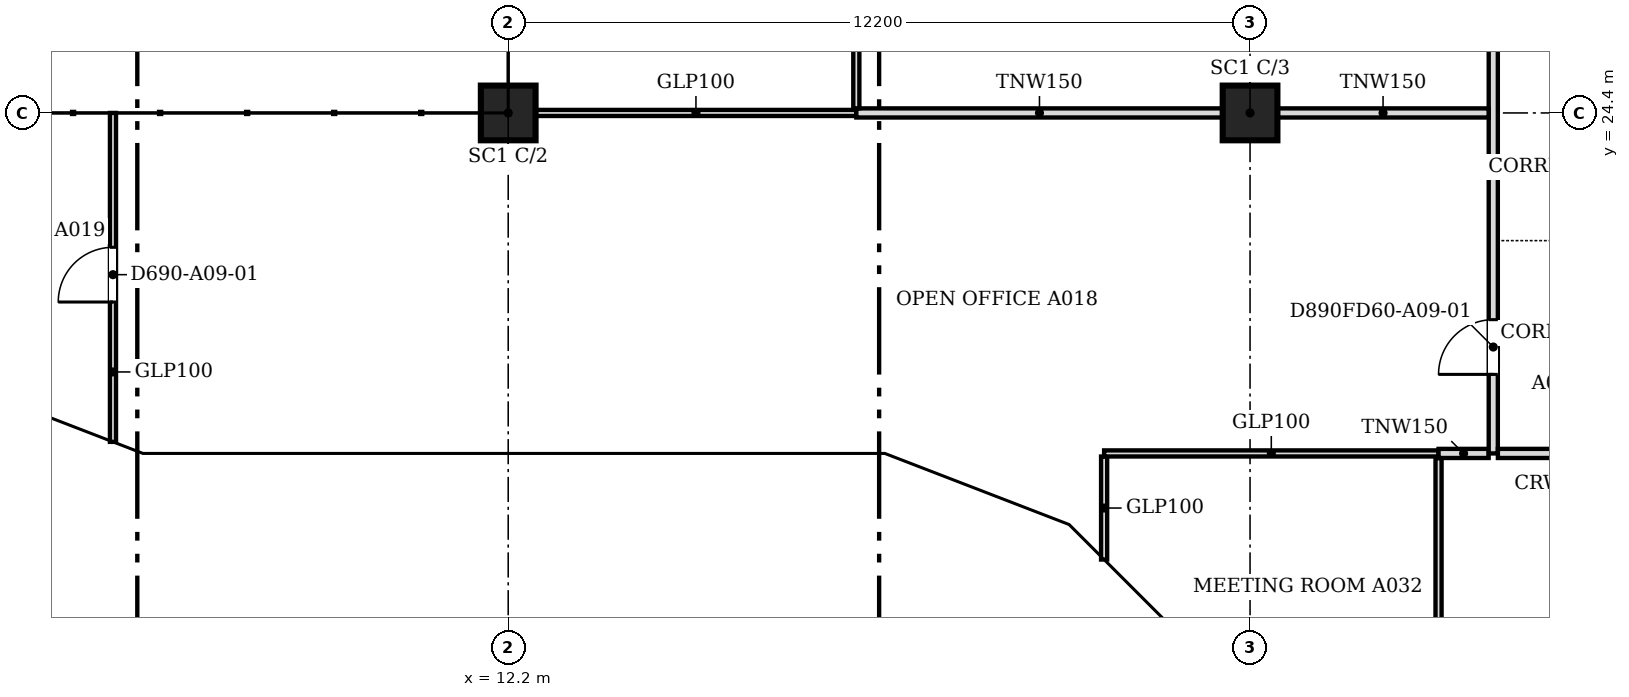
"""IFC4 building model, lengths in metres.
Left out: names, types, materials, properties, quantities, classifications, styles, units other than length and angle.
Written with IfcOpenShell. Run it as: python <this file> out.ifc"""

import sys

from ifc_helpers import new_model, si_unit, direction, frame, frame_2d, origin, origin_2d, place, context, subcontext, project, spatial, polyline, rectangle, outline, extrude, faceted_brep, source, transform, mapped, element, fill, save


model = new_model("IFC4")
c1 = context("Model", 3, precision=1e-05, world=origin(), true_north=direction((0.0, 1.0)))
c2 = subcontext(c1, "Body", "Model", "MODEL_VIEW")
j1 = project(units=[si_unit("LENGTHUNIT", "METRE"), si_unit("PLANEANGLEUNIT", "RADIAN")], contexts=[c1])
p1 = place(None, origin())
s1 = spatial("IfcSite", under=j1, at=p1, CompositionType="ELEMENT")
p2 = place(p1, origin())
s2 = spatial("IfcBuilding", under=s1, at=p2, CompositionType="ELEMENT")
p3 = place(p2, frame((0.0, 0.0, 99.0)))
s3 = spatial("IfcBuildingStorey", under=s2, at=p3, CompositionType="ELEMENT", Elevation=99.0)
for number, where, z_axis, x_axis in (
    (1, (12.2, 24.4, 0.0), (0.0, 0.0, 1.0), (1.0, 0.0, 0.0)),
    (2, (24.4, 24.4, 0.0), (0.0, 0.0, 1.0), (1.0, 0.0, 0.0)),
):
    element("IfcColumn", number, at=place(p3, frame(where, z_axis=z_axis, x_axis=x_axis)), inside=s3, PredefinedType="COLUMN", context=c2, shape_type="SweptSolid", body=[
        extrude(rectangle(XDim=0.9, YDim=0.9, at=origin_2d()), origin(), (0.0, 0.0, 1.0), 3.6),
    ])
m1 = source(origin(), c2, "Body", "Brep", [
    faceted_brep([(2.95, -0.25, 0.0), (2.997, -0.25, 0.059), (2.997, -0.25, 7.541), (2.95, -0.25, 7.6), (0.0, -0.25, 3.8), (0.053, 0.25, 3.868), (2.904, 0.25, 7.54), (2.904, 0.25, 0.06), (0.053, 0.25, 3.732), (2.95, 0.0, 0.0), (2.95, 0.0, 7.6), (0.0, 0.0, 3.8)], [[[0, 1, 2, 3, 4]], [[5, 6, 7, 8]], [[1, 0, 9]], [[10, 3, 2]], [[6, 5, 11, 4, 3, 10]], [[8, 7, 9, 0, 4, 11]], [[8, 11, 5]], [[1, 9, 7, 6, 10, 2]]]),
])
p4 = place(p3, frame((3.394, 19.612, -3.8), z_axis=(0.0, 0.0, 1.0), x_axis=(0.932990326376, -0.359901446078, 0.0)))
e3 = element("IfcWall", 3, at=p4, inside=s3, PredefinedType="SOLIDWALL", context=c2, shape_type="MappedRepresentation", body=[
    mapped(m1, transform((0.0, 0.0, 0.0), scale=1.0)),
])
m2 = source(origin(), c2, "Body", "SweptSolid", [
    extrude(outline(polyline([(2.75, 6.935), (0.316, 3.8), (2.75, 0.665), (2.75, 6.935)])), frame((0.0, 0.26, 0.0), z_axis=(0.0, -1.0, 0.0), x_axis=(1.0, 0.0, 0.0)), (0.0, 0.0, 1.0), 0.52),
])
p5 = place(p4, origin())
e4 = element("IfcOpeningElement", 4, at=p5, cuts=e3, PredefinedType="OPENING", context=c2, shape_type="MappedRepresentation", body=[
    mapped(m2, transform((0.0, 0.0, 0.0), scale=1.0)),
])
m3 = source(origin(), c2, "Body", "Brep", [
    faceted_brep([(0.047, -0.25, 0.0), (3.05, -0.25, 3.8), (0.047, -0.25, 7.6), (0.0, -0.25, 7.54), (0.0, -0.25, 0.06), (0.093, 0.25, 7.541), (3.05, 0.25, 3.8), (0.093, 0.25, 0.059), (0.047, 0.0, 0.0), (0.047, 0.0, 7.6)], [[[0, 1, 2, 3, 4]], [[5, 6, 7]], [[7, 6, 1, 0, 8]], [[6, 5, 9, 2, 1]], [[3, 2, 9]], [[8, 0, 4]], [[7, 8, 4, 3, 9, 5]]]),
])
p6 = place(p3, frame((6.1, 18.55, -3.8), z_axis=(0.0, 0.0, 1.0), x_axis=(1.0, 0.0, 0.0)))
e5 = element("IfcWall", 5, at=p6, inside=s3, PredefinedType="SOLIDWALL", context=c2, shape_type="MappedRepresentation", body=[
    mapped(m3, transform((0.0, 0.0, 0.0), scale=1.0)),
])
m4 = source(origin(), c2, "Body", "SweptSolid", [
    extrude(outline(polyline([(0.247, 0.656), (2.731, 3.8), (0.247, 6.944), (0.247, 0.656)])), frame((0.0, 0.26, 0.0), z_axis=(0.0, -1.0, 0.0), x_axis=(1.0, 0.0, 0.0)), (0.0, 0.0, 1.0), 0.52),
])
p7 = place(p6, origin())
e6 = element("IfcOpeningElement", 6, at=p7, cuts=e5, PredefinedType="OPENING", context=c2, shape_type="MappedRepresentation", body=[
    mapped(m4, transform((0.0, 0.0, 0.0), scale=1.0)),
])
m5 = source(origin(), c2, "Body", "SweptSolid", [
    extrude(outline(polyline([(3.05, 0.0), (6.1, 3.8), (3.05, 7.6), (0.0, 3.8), (3.05, 0.0)])), frame((0.0, 0.25, 0.0), z_axis=(0.0, -1.0, 0.0), x_axis=(1.0, 0.0, 0.0)), (0.0, 0.0, 1.0), 0.5),
])
p8 = place(p3, frame((9.15, 18.55, -3.8), z_axis=(0.0, 0.0, 1.0), x_axis=(1.0, 0.0, 0.0)))
e7 = element("IfcWall", 7, at=p8, inside=s3, PredefinedType="SOLIDWALL", context=c2, shape_type="MappedRepresentation", body=[
    mapped(m5, transform((0.0, 0.0, 0.0), scale=1.0)),
])
m6 = source(origin(), c2, "Body", "SweptSolid", [
    extrude(outline(polyline([(3.05, 0.399), (5.78, 3.8), (3.05, 7.201), (0.321, 3.8), (3.05, 0.399)])), frame((0.0, 0.26, 0.0), z_axis=(0.0, -1.0, 0.0), x_axis=(1.0, 0.0, 0.0)), (0.0, 0.0, 1.0), 0.52),
])
p9 = place(p8, origin())
e8 = element("IfcOpeningElement", 8, at=p9, cuts=e7, PredefinedType="OPENING", context=c2, shape_type="MappedRepresentation", body=[
    mapped(m6, transform((0.0, 0.0, 0.0), scale=1.0)),
])
m7 = source(origin(), c2, "Body", "Brep", [
    faceted_brep([(3.05, -0.25, 7.543), (0.0, -0.25, 3.8), (3.05, -0.25, 0.057), (0.0, 0.25, 3.8), (3.096, 0.25, 7.6), (3.143, 0.25, 7.544), (3.143, 0.25, 0.056), (3.096, 0.25, 0.0), (3.096, -0.0, 0.0), (3.096, -0.0, 7.6)], [[[0, 1, 2]], [[3, 4, 5, 6, 7]], [[7, 6, 8]], [[5, 4, 9]], [[4, 3, 1, 0, 9]], [[3, 7, 8, 2, 1]], [[2, 8, 6, 5, 9, 0]]]),
])
p10 = place(p3, frame((15.25, 18.55, -3.8), z_axis=(0.0, 0.0, 1.0), x_axis=(1.0, 0.0, 0.0)))
e9 = element("IfcWall", 9, at=p10, inside=s3, PredefinedType="SOLIDWALL", context=c2, shape_type="MappedRepresentation", body=[
    mapped(m7, transform((0.0, 0.0, 0.0), scale=1.0)),
])
m8 = source(origin(), c2, "Body", "SweptSolid", [
    extrude(outline(polyline([(2.896, 6.959), (0.323, 3.8), (2.896, 0.641), (2.896, 6.959)])), frame((0.0, 0.26, 0.0), z_axis=(0.0, -1.0, 0.0), x_axis=(1.0, 0.0, 0.0)), (0.0, 0.0, 1.0), 0.52),
])
p11 = place(p10, origin())
e10 = element("IfcOpeningElement", 10, at=p11, cuts=e9, PredefinedType="OPENING", context=c2, shape_type="MappedRepresentation", body=[
    mapped(m8, transform((0.0, 0.0, 0.0), scale=1.0)),
])
m9 = source(origin(), c2, "Body", "Brep", [
    faceted_brep([(0.093, -0.25, 0.056), (3.143, -0.25, 3.736), (3.143, -0.25, 3.864), (0.093, -0.25, 7.544), (0.0, 0.25, 7.543), (0.047, 0.25, 7.6), (3.196, 0.25, 3.8), (0.047, 0.25, 0.0), (0.0, 0.25, 0.057), (3.196, -0.0, 3.8), (0.047, 0.0, 0.0), (0.047, 0.0, 7.6)], [[[0, 1, 2, 3]], [[4, 5, 6, 7, 8]], [[7, 6, 9, 1, 0, 10]], [[6, 5, 11, 3, 2, 9]], [[5, 4, 11]], [[8, 7, 10]], [[8, 10, 0, 3, 11, 4]], [[1, 9, 2]]]),
])
p12 = place(p3, frame((18.303, 18.567, -3.8), z_axis=(0.0, 0.0, 1.0), x_axis=(0.932978940178, -0.359930961693, 0.0)))
e11 = element("IfcWall", 11, at=p12, inside=s3, PredefinedType="SOLIDWALL", context=c2, shape_type="MappedRepresentation", body=[
    mapped(m9, transform((0.0, 0.0, 0.0), scale=1.0)),
])
m10 = source(origin(), c2, "Body", "SweptSolid", [
    extrude(outline(polyline([(0.247, 0.633), (2.871, 3.8), (0.247, 6.967), (0.247, 0.633)])), frame((0.0, 0.26, 0.0), z_axis=(0.0, -1.0, 0.0), x_axis=(1.0, 0.0, 0.0)), (0.0, 0.0, 1.0), 0.52),
])
p13 = place(p12, origin())
e12 = element("IfcOpeningElement", 12, at=p13, cuts=e11, PredefinedType="OPENING", context=c2, shape_type="MappedRepresentation", body=[
    mapped(m10, transform((0.0, 0.0, 0.0), scale=1.0)),
])
m11 = source(origin(), c2, "Body", "Brep", [
    faceted_brep([(3.103, -0.25, 7.536), (0.053, -0.25, 3.864), (0.053, -0.25, 3.736), (3.103, -0.25, 0.064), (0.0, 0.25, 3.8), (3.156, 0.25, 7.6), (3.209, 0.25, 7.536), (3.209, 0.25, 0.064), (3.156, 0.25, 0.0), (3.156, -0.0, 0.0), (3.156, -0.0, 7.6), (0.0, 0.0, 3.8)], [[[0, 1, 2, 3]], [[4, 5, 6, 7, 8]], [[8, 7, 9]], [[6, 5, 10]], [[5, 4, 11, 1, 0, 10]], [[4, 8, 9, 3, 2, 11]], [[11, 2, 1]], [[3, 9, 7, 6, 10, 0]]]),
])
p14 = place(p3, frame((21.285, 17.417, -3.8), z_axis=(0.0, 0.0, 1.0), x_axis=(0.707106781187, -0.707106781187, 0.0)))
e13 = element("IfcWall", 13, at=p14, inside=s3, PredefinedType="SOLIDWALL", context=c2, shape_type="MappedRepresentation", body=[
    mapped(m11, transform((0.0, 0.0, 0.0), scale=1.0)),
])
m12 = source(origin(), c2, "Body", "SweptSolid", [
    extrude(outline(polyline([(2.956, 6.968), (0.325, 3.8), (2.956, 0.632), (2.956, 6.968)])), frame((0.0, 0.26, 0.0), z_axis=(0.0, -1.0, 0.0), x_axis=(1.0, 0.0, 0.0)), (0.0, 0.0, 1.0), 0.52),
])
p15 = place(p14, origin())
e14 = element("IfcOpeningElement", 14, at=p15, cuts=e13, PredefinedType="OPENING", context=c2, shape_type="MappedRepresentation", body=[
    mapped(m12, transform((0.0, 0.0, 0.0), scale=1.0)),
])
p16 = place(p2, frame((0.0, 0.0, 102.8)))
s4 = spatial("IfcBuildingStorey", under=s2, at=p16, CompositionType="ELEMENT", Elevation=102.8)
m13 = source(origin(), c2, "Body", "Brep", [
    faceted_brep([(0.053, -0.25, 0.0), (3.003, -0.25, 3.8), (0.053, -0.25, 7.6), (0.0, -0.25, 7.532), (0.0, -0.25, 0.068), (0.106, 0.25, 7.532), (2.957, 0.25, 3.86), (2.957, 0.25, 3.74), (0.106, 0.25, 0.068), (3.003, 0.0, 3.8), (0.053, 0.0, 0.0), (0.053, 0.0, 7.6)], [[[0, 1, 2, 3, 4]], [[5, 6, 7, 8]], [[8, 7, 9, 1, 0, 10]], [[6, 5, 11, 2, 1, 9]], [[3, 2, 11]], [[10, 0, 4]], [[8, 10, 4, 3, 11, 5]], [[9, 7, 6]]]),
])
p17 = place(p16, frame((3.344, 19.631, -3.8), z_axis=(0.0, 0.0, 1.0), x_axis=(0.933007896601, -0.359855894603, 0.0)))
e15 = element("IfcWall", 15, at=p17, inside=s4, PredefinedType="SOLIDWALL", context=c2, shape_type="MappedRepresentation", body=[
    mapped(m13, transform((0.0, 0.0, 0.0), scale=1.0)),
])
m14 = source(origin(), c2, "Body", "SweptSolid", [
    extrude(outline(polyline([(0.253, 0.665), (2.687, 3.8), (0.253, 6.935), (0.253, 0.665)])), frame((0.0, 0.26, 0.0), z_axis=(0.0, -1.0, 0.0), x_axis=(1.0, 0.0, 0.0)), (0.0, 0.0, 1.0), 0.52),
])
p18 = place(p17, origin())
e16 = element("IfcOpeningElement", 16, at=p18, cuts=e15, PredefinedType="OPENING", context=c2, shape_type="MappedRepresentation", body=[
    mapped(m14, transform((0.0, 0.0, 0.0), scale=1.0)),
])
m15 = source(origin(), c2, "Body", "Brep", [
    faceted_brep([(3.003, -0.25, 0.0), (6.053, -0.25, 3.8), (3.003, -0.25, 7.6), (0.0, -0.25, 3.8), (0.047, 0.25, 3.859), (3.003, 0.25, 7.6), (6.053, 0.25, 3.8), (3.003, 0.25, 0.0), (0.047, 0.25, 3.741), (0.0, 0.0, 3.8)], [[[0, 1, 2, 3]], [[4, 5, 6, 7, 8]], [[7, 6, 1, 0]], [[6, 5, 2, 1]], [[5, 4, 9, 3, 2]], [[8, 7, 0, 3, 9]], [[8, 9, 4]]]),
])
p19 = place(p16, frame((6.146, 18.55, -3.8), z_axis=(0.0, 0.0, 1.0), x_axis=(1.0, 0.0, 0.0)))
e17 = element("IfcWall", 17, at=p19, inside=s4, PredefinedType="SOLIDWALL", context=c2, shape_type="MappedRepresentation", body=[
    mapped(m15, transform((0.0, 0.0, 0.0), scale=1.0)),
])
m16 = source(origin(), c2, "Body", "SweptSolid", [
    extrude(outline(polyline([(3.005, 0.401), (5.733, 3.8), (3.005, 7.199), (0.319, 3.8), (3.005, 0.401)])), frame((0.0, 0.26, 0.0), z_axis=(0.0, -1.0, 0.0), x_axis=(1.0, 0.0, 0.0)), (0.0, 0.0, 1.0), 0.52),
])
p20 = place(p19, origin())
e18 = element("IfcOpeningElement", 18, at=p20, cuts=e17, PredefinedType="OPENING", context=c2, shape_type="MappedRepresentation", body=[
    mapped(m16, transform((0.0, 0.0, 0.0), scale=1.0)),
])
m17 = source(origin(), c2, "Body", "Brep", [
    faceted_brep([(3.05, -0.25, 0.0), (6.1, -0.25, 3.743), (6.1, -0.25, 3.857), (3.05, -0.25, 7.6), (0.0, -0.25, 3.8), (0.0, 0.25, 3.8), (3.05, 0.25, 7.6), (6.146, 0.25, 3.8), (3.05, 0.25, 0.0), (6.146, -0.0, 3.8)], [[[0, 1, 2, 3, 4]], [[5, 6, 7, 8]], [[8, 7, 9, 1, 0]], [[7, 6, 3, 2, 9]], [[6, 5, 4, 3]], [[5, 8, 0, 4]], [[1, 9, 2]]]),
])
p21 = place(p16, frame((12.2, 18.55, -3.8), z_axis=(0.0, 0.0, 1.0), x_axis=(1.0, 0.0, 0.0)))
e19 = element("IfcWall", 19, at=p21, inside=s4, PredefinedType="SOLIDWALL", context=c2, shape_type="MappedRepresentation", body=[
    mapped(m17, transform((0.0, 0.0, 0.0), scale=1.0)),
])
m18 = source(origin(), c2, "Body", "SweptSolid", [
    extrude(outline(polyline([(3.052, 0.397), (5.824, 3.8), (3.052, 7.202), (0.321, 3.8), (3.052, 0.397)])), frame((0.0, 0.26, 0.0), z_axis=(0.0, -1.0, 0.0), x_axis=(1.0, 0.0, 0.0)), (0.0, 0.0, 1.0), 0.52),
])
p22 = place(p21, origin())
e20 = element("IfcOpeningElement", 20, at=p22, cuts=e19, PredefinedType="OPENING", context=c2, shape_type="MappedRepresentation", body=[
    mapped(m18, transform((0.0, 0.0, 0.0), scale=1.0)),
])
m19 = source(origin(), c2, "Body", "Brep", [
    faceted_brep([(3.096, -0.25, 7.536), (0.047, -0.25, 3.856), (0.047, -0.25, 3.744), (3.096, -0.25, 0.064), (0.0, 0.25, 3.8), (3.149, 0.25, 7.6), (3.202, 0.25, 7.536), (3.202, 0.25, 0.064), (3.149, 0.25, 0.0), (3.149, -0.0, 0.0), (3.149, -0.0, 7.6), (0.0, 0.0, 3.8)], [[[0, 1, 2, 3]], [[4, 5, 6, 7, 8]], [[8, 7, 9]], [[6, 5, 10]], [[5, 4, 11, 1, 0, 10]], [[4, 8, 9, 3, 2, 11]], [[11, 2, 1]], [[3, 9, 7, 6, 10, 0]]]),
])
p23 = place(p16, frame((18.346, 18.55, -3.8), z_axis=(0.0, 0.0, 1.0), x_axis=(0.932985567668, -0.359913782069, 0.0)))
e21 = element("IfcWall", 21, at=p23, inside=s4, PredefinedType="SOLIDWALL", context=c2, shape_type="MappedRepresentation", body=[
    mapped(m19, transform((0.0, 0.0, 0.0), scale=1.0)),
])
m20 = source(origin(), c2, "Body", "SweptSolid", [
    extrude(outline(polyline([(2.949, 6.967), (0.325, 3.8), (2.949, 0.633), (2.949, 6.967)])), frame((0.0, 0.26, 0.0), z_axis=(0.0, -1.0, 0.0), x_axis=(1.0, 0.0, 0.0)), (0.0, 0.0, 1.0), 0.52),
])
p24 = place(p23, origin())
e22 = element("IfcOpeningElement", 22, at=p24, cuts=e21, PredefinedType="OPENING", context=c2, shape_type="MappedRepresentation", body=[
    mapped(m20, transform((0.0, 0.0, 0.0), scale=1.0)),
])
m21 = source(origin(), c2, "Body", "Brep", [
    faceted_brep([(0.106, -0.25, 0.064), (3.156, -0.25, 3.736), (3.156, -0.25, 3.864), (0.106, -0.25, 7.536), (0.0, 0.25, 7.536), (0.053, 0.25, 7.6), (3.209, 0.25, 3.8), (0.053, 0.25, 0.0), (0.0, 0.25, 0.064), (3.209, -0.0, 3.8), (0.053, 0.0, 0.0), (0.053, 0.0, 7.6)], [[[0, 1, 2, 3]], [[4, 5, 6, 7, 8]], [[7, 6, 9, 1, 0, 10]], [[6, 5, 11, 3, 2, 9]], [[5, 4, 11]], [[8, 7, 10]], [[8, 10, 0, 3, 11, 4]], [[1, 9, 2]]]),
])
p25 = place(p16, frame((21.248, 17.454, -3.8), z_axis=(0.0, 0.0, 1.0), x_axis=(0.707106781187, -0.707106781187, 0.0)))
e23 = element("IfcWall", 23, at=p25, inside=s4, PredefinedType="SOLIDWALL", context=c2, shape_type="MappedRepresentation", body=[
    mapped(m21, transform((0.0, 0.0, 0.0), scale=1.0)),
])
m22 = source(origin(), c2, "Body", "SweptSolid", [
    extrude(outline(polyline([(0.253, 0.632), (2.884, 3.8), (0.253, 6.968), (0.253, 0.632)])), frame((0.0, 0.26, 0.0), z_axis=(0.0, -1.0, 0.0), x_axis=(1.0, 0.0, 0.0)), (0.0, 0.0, 1.0), 0.52),
])
p26 = place(p25, origin())
e24 = element("IfcOpeningElement", 24, at=p26, cuts=e23, PredefinedType="OPENING", context=c2, shape_type="MappedRepresentation", body=[
    mapped(m22, transform((0.0, 0.0, 0.0), scale=1.0)),
])
p27 = place(p3, frame((27.5, 10.276, 0.0), z_axis=(0.0, 0.0, 1.0), x_axis=(0.0, 1.0, 0.0)))
e25 = element("IfcWall", 25, at=p27, inside=s3, PredefinedType="PARTITIONING", context=c2, shape_type="SweptSolid", body=[
    extrude(rectangle(XDim=8.448, YDim=0.1, at=frame_2d((4.224, 0.0))), origin(), (0.0, 0.0, 1.0), 3.067),
])
m23 = source(origin(), c2, "Body", "SweptSolid", [
    extrude(rectangle(XDim=0.9, YDim=2.1, at=frame_2d((0.45, 1.05))), frame((0.0, 0.06, 0.0), z_axis=(0.0, -1.0, 0.0), x_axis=(1.0, 0.0, 0.0)), (0.0, 0.0, 1.0), 0.12),
])
p28 = place(p27, frame((3.8, 0.0, 0.0)))
e26 = element("IfcOpeningElement", 26, at=p28, cuts=e25, PredefinedType="OPENING", context=c2, shape_type="MappedRepresentation", body=[
    mapped(m23, transform((0.0, 0.0, 0.0), scale=1.0)),
])
p29 = place(p3, frame((22.0, 17.055, 0.0), z_axis=(0.0, 0.0, 1.0), x_axis=(0.0, 1.0, 0.0)))
e27 = element("IfcWall", 27, at=p29, inside=s3, PredefinedType="PARTITIONING", context=c2, shape_type="SweptSolid", body=[
    extrude(rectangle(XDim=1.694, YDim=0.1, at=frame_2d((0.847, 0.0))), origin(), (0.0, 0.0, 1.0), 3.067),
])
p30 = place(p3, frame((22.0, 18.8, 0.0), z_axis=(0.0, 0.0, 1.0), x_axis=(1.0, 0.0, 0.0)))
e28 = element("IfcWall", 28, at=p30, inside=s3, PredefinedType="PARTITIONING", context=c2, shape_type="SweptSolid", body=[
    extrude(rectangle(XDim=5.499, YDim=0.1, at=frame_2d((2.75, 0.0))), origin(), (0.0, 0.0, 1.0), 3.067),
])
p31 = place(p3, frame((27.5, 18.8, 0.0), z_axis=(0.0, 0.0, 1.0), x_axis=(1.0, 0.0, 0.0)))
e29 = element("IfcWall", 29, at=p31, inside=s3, PredefinedType="PARTITIONING", context=c2, shape_type="SweptSolid", body=[
    extrude(rectangle(XDim=0.824, YDim=0.15, at=frame_2d((0.412, 0.0))), origin(), (0.0, 0.0, 1.0), 3.067),
])
p32 = place(p3, frame((28.4, 18.8, 0.0), z_axis=(0.0, 0.0, 1.0), x_axis=(0.0, 1.0, 0.0)))
e30 = element("IfcWall", 30, at=p32, inside=s3, PredefinedType="PARTITIONING", context=c2, shape_type="SweptSolid", body=[
    extrude(rectangle(XDim=26.824, YDim=0.15, at=frame_2d((13.412, 0.0))), origin(), (0.0, 0.0, 1.0), 3.067),
])
m24 = source(origin(), c2, "Body", "SweptSolid", [
    extrude(rectangle(XDim=0.9, YDim=2.1, at=frame_2d((0.45, 1.05))), frame((0.0, 0.085, 0.0), z_axis=(0.0, -1.0, 0.0), x_axis=(1.0, 0.0, 0.0)), (0.0, 0.0, 1.0), 0.17),
])
p33 = place(p32, frame((1.3, 0.0, 0.0)))
e31 = element("IfcOpeningElement", 31, at=p33, cuts=e30, PredefinedType="OPENING", context=c2, shape_type="MappedRepresentation", body=[
    mapped(m24, transform((0.0, 0.0, 0.0), scale=1.0)),
])
m25 = source(origin(), c2, "Body", "SweptSolid", [
    extrude(rectangle(XDim=1.0, YDim=2.1, at=frame_2d((0.5, 1.05))), frame((0.0, 0.085, 0.0), z_axis=(0.0, -1.0, 0.0), x_axis=(1.0, 0.0, 0.0)), (0.0, 0.0, 1.0), 0.17),
])
p34 = place(p32, frame((23.351, 0.0, 0.0)))
e32 = element("IfcOpeningElement", 32, at=p34, cuts=e30, PredefinedType="OPENING", context=c2, shape_type="MappedRepresentation", body=[
    mapped(m25, transform((0.0, 0.0, 0.0), scale=1.0)),
])
p35 = place(p32, frame((8.2, 0.0, 0.0)))
e33 = element("IfcOpeningElement", 33, at=p35, cuts=e30, PredefinedType="OPENING", context=c2, shape_type="MappedRepresentation", body=[
    mapped(m24, transform((0.0, 0.0, 0.0), scale=1.0)),
])
p36 = place(p32, frame((15.8, 0.0, 0.0)))
e34 = element("IfcOpeningElement", 34, at=p36, cuts=e30, PredefinedType="OPENING", context=c2, shape_type="MappedRepresentation", body=[
    mapped(m25, transform((0.0, 0.0, 0.0), scale=1.0)),
])
p37 = place(p3, frame((28.476, 18.8, 0.0), z_axis=(0.0, 0.0, 1.0), x_axis=(1.0, 0.0, 0.0)))
e35 = element("IfcWall", 35, at=p37, inside=s3, PredefinedType="PARTITIONING", context=c2, shape_type="SweptSolid", body=[
    extrude(rectangle(XDim=1.948, YDim=0.15, at=frame_2d((0.974, 0.0))), origin(), (0.0, 0.0, 1.0), 3.067),
])
p38 = place(p3, frame((5.7, 18.99, 0.0), z_axis=(0.0, 0.0, 1.0), x_axis=(0.0, 1.0, 0.0)))
e36 = element("IfcWall", 36, at=p38, inside=s3, PredefinedType="PARTITIONING", context=c2, shape_type="SweptSolid", body=[
    extrude(rectangle(XDim=5.41, YDim=0.1, at=frame_2d((2.705, 0.0))), origin(), (0.0, 0.0, 1.0), 3.067),
])
p39 = place(p38, frame((2.3, 0.0, 0.0)))
e37 = element("IfcOpeningElement", 37, at=p39, cuts=e36, PredefinedType="OPENING", context=c2, shape_type="MappedRepresentation", body=[
    mapped(m23, transform((0.0, 0.0, 0.0), scale=1.0)),
])
p40 = place(p3, frame((12.651, 24.4, 0.0), z_axis=(0.0, 0.0, 1.0), x_axis=(1.0, 0.0, 0.0)))
e38 = element("IfcWall", 38, at=p40, inside=s3, PredefinedType="PARTITIONING", context=c2, shape_type="SweptSolid", body=[
    extrude(rectangle(XDim=5.273, YDim=0.1, at=frame_2d((2.637, 0.0))), origin(), (0.0, 0.0, 1.0), 3.067),
])
p41 = place(p3, frame((17.925, 24.4, 0.0), z_axis=(0.0, 0.0, 1.0), x_axis=(1.0, 0.0, 0.0)))
e39 = element("IfcWall", 39, at=p41, inside=s3, PredefinedType="PARTITIONING", context=c2, shape_type="SweptSolid", body=[
    extrude(rectangle(XDim=6.024, YDim=0.15, at=frame_2d((3.012, 0.0))), origin(), (0.0, 0.0, 1.0), 3.067),
])
p42 = place(p3, frame((24.851, 24.4, 0.0), z_axis=(0.0, 0.0, 1.0), x_axis=(1.0, 0.0, 0.0)))
e40 = element("IfcWall", 40, at=p42, inside=s3, PredefinedType="PARTITIONING", context=c2, shape_type="SweptSolid", body=[
    extrude(rectangle(XDim=3.473, YDim=0.15, at=frame_2d((1.736, 0.0))), origin(), (0.0, 0.0, 1.0), 3.067),
])
p43 = place(p3, frame((17.925, 24.476, 0.0), z_axis=(0.0, 0.0, 1.0), x_axis=(0.0, 1.0, 0.0)))
e41 = element("IfcWall", 41, at=p43, inside=s3, PredefinedType="PARTITIONING", context=c2, shape_type="SweptSolid", body=[
    extrude(rectangle(XDim=5.948, YDim=0.1, at=frame_2d((2.974, 0.0))), origin(), (0.0, 0.0, 1.0), 3.067),
])
p44 = place(p43, frame((2.5, 0.0, 0.0)))
e42 = element("IfcOpeningElement", 42, at=p44, cuts=e41, PredefinedType="OPENING", context=c2, shape_type="MappedRepresentation", body=[
    mapped(m23, transform((0.0, 0.0, 0.0), scale=1.0)),
])
m26 = source(origin(), c2, "Body", "SweptSolid", [
    extrude(rectangle(XDim=0.9, YDim=2.1, at=frame_2d((0.45, 1.05))), frame((0.0, 0.025, 0.0), z_axis=(0.0, -1.0, 0.0), x_axis=(1.0, 0.0, 0.0)), (0.0, 0.0, 1.0), 0.05),
])
p45 = place(p33, origin())
e43 = element("IfcDoor", 43, at=p45, inside=s3, OperationType="SINGLE_SWING_LEFT", PredefinedType="DOOR", context=c2, shape_type="MappedRepresentation", body=[
    mapped(m26, transform((0.0, 0.0, 0.0), scale=1.0)),
])
fill(e31, e43)
p46 = place(p39, origin())
e44 = element("IfcDoor", 44, at=p46, inside=s3, OperationType="SINGLE_SWING_LEFT", PredefinedType="DOOR", context=c2, shape_type="MappedRepresentation", body=[
    mapped(m26, transform((0.0, 0.0, 0.0), scale=1.0)),
])
fill(e37, e44)
save(model, sys.argv[1])
